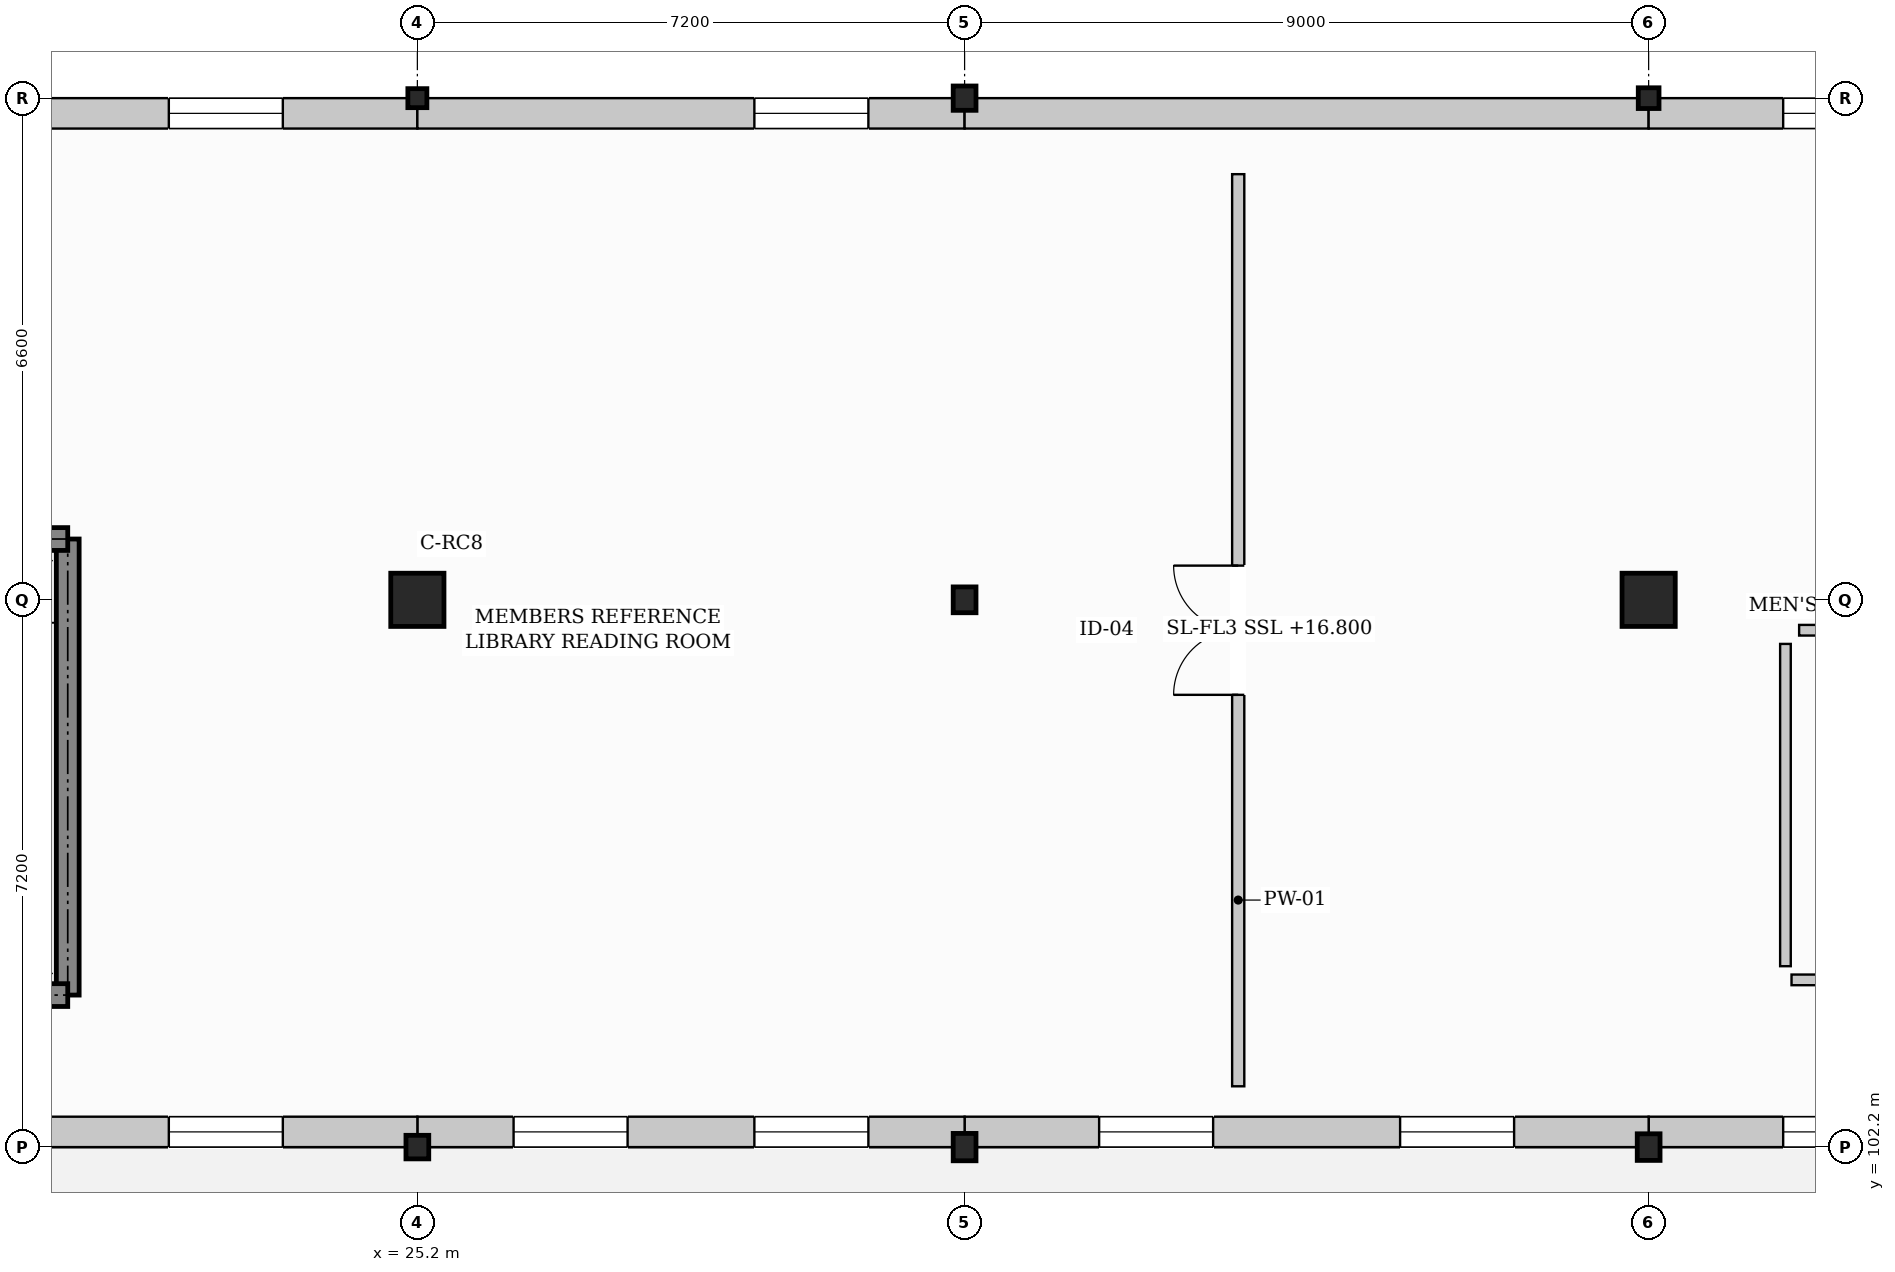
"""IFC4 building model, lengths in metres.
Left out: names, types, materials, properties, quantities, classifications, styles, units other than length and angle.
Written with IfcOpenShell. Run it as: python <this file> out.ifc"""

import sys

from ifc_helpers import new_model, si_unit, direction, frame, frame_2d, origin, origin_2d, place, context, subcontext, project, spatial, rectangle, hollow_rectangle, hollow_circle, i_section, extrude, element, fill, save


model = new_model("IFC4")
c1 = context("Model", 3, precision=1e-05, world=origin(), true_north=direction((0.0, 1.0)))
c2 = subcontext(c1, "Body", "Model", "MODEL_VIEW")
j1 = project(units=[si_unit("LENGTHUNIT", "METRE"), si_unit("PLANEANGLEUNIT", "RADIAN")], contexts=[c1])
p1 = place(None, origin())
s1 = spatial("IfcSite", under=j1, at=p1, CompositionType="ELEMENT")
p2 = place(p1, origin())
s2 = spatial("IfcBuilding", under=s1, at=p2, CompositionType="ELEMENT")
p3 = place(p2, frame((0.0, 0.0, 16.8)))
s3 = spatial("IfcBuildingStorey", under=s2, at=p3, CompositionType="ELEMENT", Elevation=16.8)
p4 = place(p3, frame((25.2, 102.2, 0.0), z_axis=(0.0, 0.0, 1.0), x_axis=(1.0, 0.0, 0.0)))
e1 = element("IfcColumn", 1, at=p4, inside=s3, PredefinedType="COLUMN", context=c2, shape_type="SweptSolid", body=[
    extrude(i_section(OverallWidth=0.3, OverallDepth=0.31, WebThickness=0.009, FlangeThickness=0.015, FilletRadius=0.027, at=origin_2d()), origin(), (0.0, 0.0, 1.0), 3.6),
])
p5 = place(p3, frame((25.2, 109.4, 0.0), z_axis=(0.0, 0.0, 1.0), x_axis=(1.0, 0.0, 0.0)))
e2 = element("IfcColumn", 2, at=p5, inside=s3, PredefinedType="COLUMN", context=c2, shape_type="SweptSolid", body=[
    extrude(rectangle(XDim=0.7, YDim=0.7, at=origin_2d()), origin(), (0.0, 0.0, 1.0), 3.6),
])
p6 = place(p3, frame((25.2, 116.0, 0.0), z_axis=(0.0, 0.0, 1.0), x_axis=(1.0, 0.0, 0.0)))
e3 = element("IfcColumn", 3, at=p6, inside=s3, PredefinedType="COLUMN", context=c2, shape_type="SweptSolid", body=[
    extrude(hollow_rectangle(XDim=0.25, YDim=0.25, WallThickness=0.01, at=origin_2d()), origin(), (0.0, 0.0, 1.0), 3.6),
])
p7 = place(p3, frame((32.4, 102.2, 0.0), z_axis=(0.0, 0.0, 1.0), x_axis=(1.0, 0.0, 0.0)))
e4 = element("IfcColumn", 4, at=p7, inside=s3, PredefinedType="COLUMN", context=c2, shape_type="SweptSolid", body=[
    extrude(i_section(OverallWidth=0.3, OverallDepth=0.36, WebThickness=0.012, FlangeThickness=0.022, FilletRadius=0.027, at=origin_2d()), origin(), (0.0, 0.0, 1.0), 3.6),
])
p8 = place(p3, frame((32.4, 109.4, 0.0), z_axis=(0.0, 0.0, 1.0), x_axis=(1.0, 0.0, 0.0)))
e5 = element("IfcColumn", 5, at=p8, inside=s3, PredefinedType="COLUMN", context=c2, shape_type="SweptSolid", body=[
    extrude(i_section(OverallWidth=0.3, OverallDepth=0.34, WebThickness=0.012, FlangeThickness=0.021, FilletRadius=0.027, at=origin_2d()), origin(), (0.0, 0.0, 1.0), 3.6),
])
p9 = place(p3, frame((32.4, 116.0, 0.0), z_axis=(0.0, 0.0, 1.0), x_axis=(1.0, 0.0, 0.0)))
e6 = element("IfcColumn", 6, at=p9, inside=s3, PredefinedType="COLUMN", context=c2, shape_type="SweptSolid", body=[
    extrude(i_section(OverallWidth=0.3, OverallDepth=0.32, WebThickness=0.011, FlangeThickness=0.021, FilletRadius=0.027, at=origin_2d()), origin(), (0.0, 0.0, 1.0), 3.6),
])
p10 = place(p3, frame((41.4, 102.2, 0.0), z_axis=(0.0, 0.0, 1.0), x_axis=(1.0, 0.0, 0.0)))
e7 = element("IfcColumn", 7, at=p10, inside=s3, PredefinedType="COLUMN", context=c2, shape_type="SweptSolid", body=[
    extrude(i_section(OverallWidth=0.3, OverallDepth=0.35, WebThickness=0.01, FlangeThickness=0.018, FilletRadius=0.027, at=origin_2d()), origin(), (0.0, 0.0, 1.0), 3.6),
])
p11 = place(p3, frame((41.4, 109.4, 0.0), z_axis=(0.0, 0.0, 1.0), x_axis=(1.0, 0.0, 0.0)))
e8 = element("IfcColumn", 8, at=p11, inside=s3, PredefinedType="COLUMN", context=c2, shape_type="SweptSolid", body=[
    extrude(rectangle(XDim=0.7, YDim=0.7, at=origin_2d()), origin(), (0.0, 0.0, 1.0), 3.6),
])
p12 = place(p3, frame((41.4, 116.0, 0.0), z_axis=(0.0, 0.0, 1.0), x_axis=(1.0, 0.0, 0.0)))
e9 = element("IfcColumn", 9, at=p12, inside=s3, PredefinedType="COLUMN", context=c2, shape_type="SweptSolid", body=[
    extrude(hollow_circle(Radius=0.136, WallThickness=0.012, at=origin_2d()), origin(), (0.0, 0.0, 1.0), 3.6),
])
p13 = place(p3, frame((16.2, 115.8, 0.0), z_axis=(0.0, 0.0, 1.0), x_axis=(1.0, 0.0, 0.0)))
e10 = element("IfcWall", 10, at=p13, inside=s3, PredefinedType="SOLIDWALL", context=c2, shape_type="SweptSolid", body=[
    extrude(rectangle(XDim=9.0, YDim=0.4, at=frame_2d((4.5, 0.0))), origin(), (0.0, 0.0, 1.0), 2.7),
])
p14 = place(p13, frame((1.77, 0.0, 0.75)))
e11 = element("IfcOpeningElement", 11, at=p14, cuts=e10, PredefinedType="OPENING", context=c2, shape_type="SweptSolid", body=[
    extrude(rectangle(XDim=1.5, YDim=1.6, at=frame_2d((0.75, 0.8))), frame((0.0, 0.21, 0.0), z_axis=(0.0, -1.0, 0.0), x_axis=(1.0, 0.0, 0.0)), (0.0, 0.0, 1.0), 0.42),
])
p15 = place(p13, frame((5.73, 0.0, 0.75)))
e12 = element("IfcOpeningElement", 12, at=p15, cuts=e10, PredefinedType="OPENING", context=c2, shape_type="SweptSolid", body=[
    extrude(rectangle(XDim=1.5, YDim=1.6, at=frame_2d((0.75, 0.8))), frame((0.0, 0.21, 0.0), z_axis=(0.0, -1.0, 0.0), x_axis=(1.0, 0.0, 0.0)), (0.0, 0.0, 1.0), 0.42),
])
p16 = place(p3, frame((25.2, 115.8, 0.0), z_axis=(0.0, 0.0, 1.0), x_axis=(1.0, 0.0, 0.0)))
e13 = element("IfcWall", 13, at=p16, inside=s3, PredefinedType="SOLIDWALL", context=c2, shape_type="SweptSolid", body=[
    extrude(rectangle(XDim=7.2, YDim=0.4, at=frame_2d((3.6, 0.0))), origin(), (0.0, 0.0, 1.0), 2.7),
])
p17 = place(p16, frame((4.434, 0.0, 0.75)))
e14 = element("IfcOpeningElement", 14, at=p17, cuts=e13, PredefinedType="OPENING", context=c2, shape_type="SweptSolid", body=[
    extrude(rectangle(XDim=1.5, YDim=1.6, at=frame_2d((0.75, 0.8))), frame((0.0, 0.21, 0.0), z_axis=(0.0, -1.0, 0.0), x_axis=(1.0, 0.0, 0.0)), (0.0, 0.0, 1.0), 0.42),
])
p18 = place(p3, frame((32.4, 115.8, 0.0), z_axis=(0.0, 0.0, 1.0), x_axis=(1.0, 0.0, 0.0)))
e15 = element("IfcWall", 15, at=p18, inside=s3, PredefinedType="SOLIDWALL", context=c2, shape_type="SweptSolid", body=[
    extrude(rectangle(XDim=9.0, YDim=0.4, at=frame_2d((4.5, 0.0))), origin(), (0.0, 0.0, 1.0), 2.74),
])
p19 = place(p3, frame((41.4, 115.8, 0.0), z_axis=(0.0, 0.0, 1.0), x_axis=(1.0, 0.0, 0.0)))
e16 = element("IfcWall", 16, at=p19, inside=s3, PredefinedType="SOLIDWALL", context=c2, shape_type="SweptSolid", body=[
    extrude(rectangle(XDim=9.0, YDim=0.4, at=frame_2d((4.5, 0.0))), origin(), (0.0, 0.0, 1.0), 2.7),
])
p20 = place(p19, frame((1.77, 0.0, 0.75)))
e17 = element("IfcOpeningElement", 17, at=p20, cuts=e16, PredefinedType="OPENING", context=c2, shape_type="SweptSolid", body=[
    extrude(rectangle(XDim=1.5, YDim=1.6, at=frame_2d((0.75, 0.8))), frame((0.0, 0.21, 0.0), z_axis=(0.0, -1.0, 0.0), x_axis=(1.0, 0.0, 0.0)), (0.0, 0.0, 1.0), 0.42),
])
p21 = place(p19, frame((5.73, 0.0, 0.75)))
e18 = element("IfcOpeningElement", 18, at=p21, cuts=e16, PredefinedType="OPENING", context=c2, shape_type="SweptSolid", body=[
    extrude(rectangle(XDim=1.5, YDim=1.6, at=frame_2d((0.75, 0.8))), frame((0.0, 0.21, 0.0), z_axis=(0.0, -1.0, 0.0), x_axis=(1.0, 0.0, 0.0)), (0.0, 0.0, 1.0), 0.42),
])
p22 = place(p3, frame((50.4, 102.4, 0.0), z_axis=(0.0, 0.0, 1.0), x_axis=(-1.0, 0.0, 0.0)))
e19 = element("IfcWall", 19, at=p22, inside=s3, PredefinedType="SOLIDWALL", context=c2, shape_type="SweptSolid", body=[
    extrude(rectangle(XDim=9.0, YDim=0.4, at=frame_2d((4.5, 0.0))), origin(), (0.0, 0.0, 1.0), 2.7),
])
p23 = place(p22, frame((1.77, 0.0, 0.75)))
e20 = element("IfcOpeningElement", 20, at=p23, cuts=e19, PredefinedType="OPENING", context=c2, shape_type="SweptSolid", body=[
    extrude(rectangle(XDim=1.5, YDim=1.6, at=frame_2d((0.75, 0.8))), frame((0.0, 0.21, 0.0), z_axis=(0.0, -1.0, 0.0), x_axis=(1.0, 0.0, 0.0)), (0.0, 0.0, 1.0), 0.42),
])
p24 = place(p22, frame((5.73, 0.0, 0.75)))
e21 = element("IfcOpeningElement", 21, at=p24, cuts=e19, PredefinedType="OPENING", context=c2, shape_type="SweptSolid", body=[
    extrude(rectangle(XDim=1.5, YDim=1.6, at=frame_2d((0.75, 0.8))), frame((0.0, 0.21, 0.0), z_axis=(0.0, -1.0, 0.0), x_axis=(1.0, 0.0, 0.0)), (0.0, 0.0, 1.0), 0.42),
])
p25 = place(p3, frame((41.4, 102.4, 0.0), z_axis=(0.0, 0.0, 1.0), x_axis=(-1.0, 0.0, 0.0)))
e22 = element("IfcWall", 22, at=p25, inside=s3, PredefinedType="SOLIDWALL", context=c2, shape_type="SweptSolid", body=[
    extrude(rectangle(XDim=9.0, YDim=0.4, at=frame_2d((4.5, 0.0))), origin(), (0.0, 0.0, 1.0), 2.74),
])
p26 = place(p25, frame((1.77, 0.0, 0.75)))
e23 = element("IfcOpeningElement", 23, at=p26, cuts=e22, PredefinedType="OPENING", context=c2, shape_type="SweptSolid", body=[
    extrude(rectangle(XDim=1.5, YDim=1.6, at=frame_2d((0.75, 0.8))), frame((0.0, 0.21, 0.0), z_axis=(0.0, -1.0, 0.0), x_axis=(1.0, 0.0, 0.0)), (0.0, 0.0, 1.0), 0.42),
])
p27 = place(p25, frame((5.73, 0.0, 0.75)))
e24 = element("IfcOpeningElement", 24, at=p27, cuts=e22, PredefinedType="OPENING", context=c2, shape_type="SweptSolid", body=[
    extrude(rectangle(XDim=1.5, YDim=1.6, at=frame_2d((0.75, 0.8))), frame((0.0, 0.21, 0.0), z_axis=(0.0, -1.0, 0.0), x_axis=(1.0, 0.0, 0.0)), (0.0, 0.0, 1.0), 0.42),
])
p28 = place(p3, frame((32.4, 102.4, 0.0), z_axis=(0.0, 0.0, 1.0), x_axis=(-1.0, 0.0, 0.0)))
e25 = element("IfcWall", 25, at=p28, inside=s3, PredefinedType="SOLIDWALL", context=c2, shape_type="SweptSolid", body=[
    extrude(rectangle(XDim=7.2, YDim=0.4, at=frame_2d((3.6, 0.0))), origin(), (0.0, 0.0, 1.0), 2.7),
])
p29 = place(p28, frame((1.266, 0.0, 0.75)))
e26 = element("IfcOpeningElement", 26, at=p29, cuts=e25, PredefinedType="OPENING", context=c2, shape_type="SweptSolid", body=[
    extrude(rectangle(XDim=1.5, YDim=1.6, at=frame_2d((0.75, 0.8))), frame((0.0, 0.21, 0.0), z_axis=(0.0, -1.0, 0.0), x_axis=(1.0, 0.0, 0.0)), (0.0, 0.0, 1.0), 0.42),
])
p30 = place(p28, frame((4.434, 0.0, 0.75)))
e27 = element("IfcOpeningElement", 27, at=p30, cuts=e25, PredefinedType="OPENING", context=c2, shape_type="SweptSolid", body=[
    extrude(rectangle(XDim=1.5, YDim=1.6, at=frame_2d((0.75, 0.8))), frame((0.0, 0.21, 0.0), z_axis=(0.0, -1.0, 0.0), x_axis=(1.0, 0.0, 0.0)), (0.0, 0.0, 1.0), 0.42),
])
p31 = place(p3, frame((25.2, 102.4, 0.0), z_axis=(0.0, 0.0, 1.0), x_axis=(-1.0, 0.0, 0.0)))
e28 = element("IfcWall", 28, at=p31, inside=s3, PredefinedType="SOLIDWALL", context=c2, shape_type="SweptSolid", body=[
    extrude(rectangle(XDim=9.0, YDim=0.4, at=frame_2d((4.5, 0.0))), origin(), (0.0, 0.0, 1.0), 2.7),
])
p32 = place(p31, frame((1.77, 0.0, 0.75)))
e29 = element("IfcOpeningElement", 29, at=p32, cuts=e28, PredefinedType="OPENING", context=c2, shape_type="SweptSolid", body=[
    extrude(rectangle(XDim=1.5, YDim=1.6, at=frame_2d((0.75, 0.8))), frame((0.0, 0.21, 0.0), z_axis=(0.0, -1.0, 0.0), x_axis=(1.0, 0.0, 0.0)), (0.0, 0.0, 1.0), 0.42),
])
p33 = place(p31, frame((5.73, 0.0, 0.75)))
e30 = element("IfcOpeningElement", 30, at=p33, cuts=e28, PredefinedType="OPENING", context=c2, shape_type="SweptSolid", body=[
    extrude(rectangle(XDim=1.5, YDim=1.6, at=frame_2d((0.75, 0.8))), frame((0.0, 0.21, 0.0), z_axis=(0.0, -1.0, 0.0), x_axis=(1.0, 0.0, 0.0)), (0.0, 0.0, 1.0), 0.42),
])
p34 = place(p3, frame((20.6, 104.2, 0.0), z_axis=(0.0, 0.0, 1.0), x_axis=(0.0, 1.0, 0.0)))
e31 = element("IfcWall", 31, at=p34, inside=s3, PredefinedType="SHEAR", context=c2, shape_type="SweptSolid", body=[
    extrude(rectangle(XDim=6.0, YDim=0.3, at=frame_2d((3.0, 0.0))), origin(), (0.0, 0.0, 1.0), 3.42),
])
for number, where, z_axis, x_axis in (
    (32, (13.6, 104.2, 0.0), (0.0, 0.0, 1.0), (1.0, 0.0, 0.0)),
    (33, (13.6, 110.2, 0.0), (0.0, 0.0, 1.0), (1.0, 0.0, 0.0)),
):
    element("IfcWall", number, at=place(p3, frame(where, z_axis=z_axis, x_axis=x_axis)), inside=s3, PredefinedType="SHEAR", context=c2, shape_type="SweptSolid", body=[
        extrude(rectangle(XDim=7.0, YDim=0.3, at=frame_2d((3.5, 0.0))), origin(), (0.0, 0.0, 1.0), 3.42),
    ])
p35 = place(p3, frame((43.38, 109.0, 0.0), z_axis=(0.0, 0.0, 1.0), x_axis=(1.0, 0.0, 0.0)))
e34 = element("IfcWall", 34, at=p35, inside=s3, PredefinedType="PARTITIONING", context=c2, shape_type="SweptSolid", body=[
    extrude(rectangle(XDim=6.24, YDim=0.14, at=frame_2d((3.12, 0.0))), origin(), (0.0, 0.0, 1.0), 3.42),
])
p36 = place(p3, frame((43.2, 104.58, 0.0), z_axis=(0.0, 0.0, 1.0), x_axis=(0.0, 1.0, 0.0)))
e35 = element("IfcWall", 35, at=p36, inside=s3, PredefinedType="PARTITIONING", context=c2, shape_type="SweptSolid", body=[
    extrude(rectangle(XDim=4.24, YDim=0.14, at=frame_2d((2.12, 0.0))), origin(), (0.0, 0.0, 1.0), 3.42),
])
p37 = place(p3, frame((43.28, 104.4, 0.0), z_axis=(0.0, 0.0, 1.0), x_axis=(1.0, 0.0, 0.0)))
e36 = element("IfcWall", 36, at=p37, inside=s3, PredefinedType="PARTITIONING", context=c2, shape_type="SweptSolid", body=[
    extrude(rectangle(XDim=2.216, YDim=0.14, at=frame_2d((1.108, 0.0))), origin(), (0.0, 0.0, 1.0), 3.42),
])
p38 = place(p37, frame((0.608, 0.0, 0.0)))
e37 = element("IfcOpeningElement", 37, at=p38, cuts=e36, PredefinedType="OPENING", context=c2, shape_type="SweptSolid", body=[
    extrude(rectangle(XDim=1.0, YDim=2.15, at=frame_2d((0.5, 1.075))), frame((0.0, 0.08, 0.0), z_axis=(0.0, -1.0, 0.0), x_axis=(1.0, 0.0, 0.0)), (0.0, 0.0, 1.0), 0.16),
])
p39 = place(p3, frame((36.0, 103.0, 0.0), z_axis=(0.0, 0.0, 1.0), x_axis=(0.0, 1.0, 0.0)))
e38 = element("IfcWall", 38, at=p39, inside=s3, PredefinedType="PARTITIONING", context=c2, shape_type="SweptSolid", body=[
    extrude(rectangle(XDim=12.0, YDim=0.16, at=frame_2d((6.0, 0.0))), origin(), (0.0, 0.0, 1.0), 2.92),
])
p40 = place(p39, frame((5.15, 0.0, 0.0)))
e39 = element("IfcOpeningElement", 39, at=p40, cuts=e38, PredefinedType="OPENING", context=c2, shape_type="SweptSolid", body=[
    extrude(rectangle(XDim=1.7, YDim=2.3, at=frame_2d((0.85, 1.15))), frame((0.0, 0.09, 0.0), z_axis=(0.0, -1.0, 0.0), x_axis=(1.0, 0.0, 0.0)), (0.0, 0.0, 1.0), 0.18),
])
p41 = place(p15, origin())
e40 = element("IfcWindow", 40, at=p41, inside=s3, PartitioningType="DOUBLE_PANEL_HORIZONTAL", PredefinedType="WINDOW", context=c2, shape_type="SweptSolid", body=[
    extrude(rectangle(XDim=1.5, YDim=1.6, at=frame_2d((0.75, 0.8))), frame((0.0, 0.03, 0.0), z_axis=(0.0, -1.0, 0.0), x_axis=(1.0, 0.0, 0.0)), (0.0, 0.0, 1.0), 0.06),
])
fill(e12, e40)
p42 = place(p17, origin())
e41 = element("IfcWindow", 41, at=p42, inside=s3, PartitioningType="DOUBLE_PANEL_HORIZONTAL", PredefinedType="WINDOW", context=c2, shape_type="SweptSolid", body=[
    extrude(rectangle(XDim=1.5, YDim=1.6, at=frame_2d((0.75, 0.8))), frame((0.0, 0.03, 0.0), z_axis=(0.0, -1.0, 0.0), x_axis=(1.0, 0.0, 0.0)), (0.0, 0.0, 1.0), 0.06),
])
fill(e14, e41)
p43 = place(p20, origin())
e42 = element("IfcWindow", 42, at=p43, inside=s3, PartitioningType="DOUBLE_PANEL_HORIZONTAL", PredefinedType="WINDOW", context=c2, shape_type="SweptSolid", body=[
    extrude(rectangle(XDim=1.5, YDim=1.6, at=frame_2d((0.75, 0.8))), frame((0.0, 0.03, 0.0), z_axis=(0.0, -1.0, 0.0), x_axis=(1.0, 0.0, 0.0)), (0.0, 0.0, 1.0), 0.06),
])
fill(e17, e42)
p44 = place(p24, origin())
e43 = element("IfcWindow", 43, at=p44, inside=s3, PartitioningType="DOUBLE_PANEL_HORIZONTAL", PredefinedType="WINDOW", context=c2, shape_type="SweptSolid", body=[
    extrude(rectangle(XDim=1.5, YDim=1.6, at=frame_2d((0.75, 0.8))), frame((0.0, 0.03, 0.0), z_axis=(0.0, -1.0, 0.0), x_axis=(1.0, 0.0, 0.0)), (0.0, 0.0, 1.0), 0.06),
])
fill(e21, e43)
p45 = place(p26, origin())
e44 = element("IfcWindow", 44, at=p45, inside=s3, PartitioningType="DOUBLE_PANEL_HORIZONTAL", PredefinedType="WINDOW", context=c2, shape_type="SweptSolid", body=[
    extrude(rectangle(XDim=1.5, YDim=1.6, at=frame_2d((0.75, 0.8))), frame((0.0, 0.03, 0.0), z_axis=(0.0, -1.0, 0.0), x_axis=(1.0, 0.0, 0.0)), (0.0, 0.0, 1.0), 0.06),
])
fill(e23, e44)
p46 = place(p27, origin())
e45 = element("IfcWindow", 45, at=p46, inside=s3, PartitioningType="DOUBLE_PANEL_HORIZONTAL", PredefinedType="WINDOW", context=c2, shape_type="SweptSolid", body=[
    extrude(rectangle(XDim=1.5, YDim=1.6, at=frame_2d((0.75, 0.8))), frame((0.0, 0.03, 0.0), z_axis=(0.0, -1.0, 0.0), x_axis=(1.0, 0.0, 0.0)), (0.0, 0.0, 1.0), 0.06),
])
fill(e24, e45)
p47 = place(p29, origin())
e46 = element("IfcWindow", 46, at=p47, inside=s3, PartitioningType="DOUBLE_PANEL_HORIZONTAL", PredefinedType="WINDOW", context=c2, shape_type="SweptSolid", body=[
    extrude(rectangle(XDim=1.5, YDim=1.6, at=frame_2d((0.75, 0.8))), frame((0.0, 0.03, 0.0), z_axis=(0.0, -1.0, 0.0), x_axis=(1.0, 0.0, 0.0)), (0.0, 0.0, 1.0), 0.06),
])
fill(e26, e46)
p48 = place(p30, origin())
e47 = element("IfcWindow", 47, at=p48, inside=s3, PartitioningType="DOUBLE_PANEL_HORIZONTAL", PredefinedType="WINDOW", context=c2, shape_type="SweptSolid", body=[
    extrude(rectangle(XDim=1.5, YDim=1.6, at=frame_2d((0.75, 0.8))), frame((0.0, 0.03, 0.0), z_axis=(0.0, -1.0, 0.0), x_axis=(1.0, 0.0, 0.0)), (0.0, 0.0, 1.0), 0.06),
])
fill(e27, e47)
p49 = place(p32, origin())
e48 = element("IfcWindow", 48, at=p49, inside=s3, PartitioningType="DOUBLE_PANEL_HORIZONTAL", PredefinedType="WINDOW", context=c2, shape_type="SweptSolid", body=[
    extrude(rectangle(XDim=1.5, YDim=1.6, at=frame_2d((0.75, 0.8))), frame((0.0, 0.03, 0.0), z_axis=(0.0, -1.0, 0.0), x_axis=(1.0, 0.0, 0.0)), (0.0, 0.0, 1.0), 0.06),
])
fill(e29, e48)
p50 = place(p40, origin())
e49 = element("IfcDoor", 49, at=p50, inside=s3, OperationType="DOUBLE_DOOR_SINGLE_SWING", PredefinedType="DOOR", context=c2, shape_type="SweptSolid", body=[
    extrude(rectangle(XDim=1.7, YDim=2.3, at=frame_2d((0.85, 1.15))), frame((0.0, 0.025, 0.0), z_axis=(0.0, -1.0, 0.0), x_axis=(1.0, 0.0, 0.0)), (0.0, 0.0, 1.0), 0.05),
])
fill(e39, e49)
save(model, sys.argv[1])
